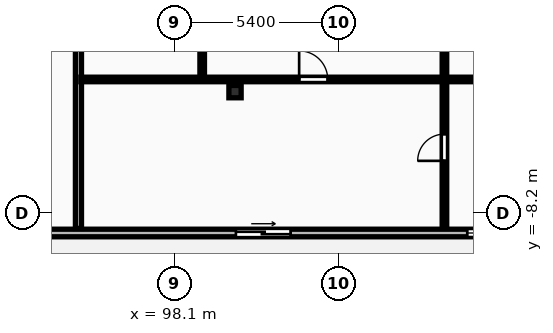
"""IFC4 building model, lengths in metres.
Left out: names, types, materials, properties, quantities, classifications, styles, units other than length and angle.
Written with IfcOpenShell. Run it as: python <this file> out.ifc"""

import sys

from ifc_helpers import new_model, si_unit, direction, frame, frame_2d, origin, origin_2d, place, context, subcontext, project, spatial, rectangle, i_section, extrude, element, fill, save


model = new_model("IFC4")
c1 = context("Model", 3, precision=1e-05, world=origin(), true_north=direction((0.0, 1.0)))
c2 = subcontext(c1, "Body", "Model", "MODEL_VIEW")
j1 = project(units=[si_unit("LENGTHUNIT", "METRE"), si_unit("PLANEANGLEUNIT", "RADIAN")], contexts=[c1])
p1 = place(None, origin())
s1 = spatial("IfcSite", under=j1, at=p1, CompositionType="ELEMENT")
p2 = place(p1, origin())
s2 = spatial("IfcBuilding", under=s1, at=p2, CompositionType="ELEMENT")
p3 = place(p2, frame((0.0, 0.0, 139.3)))
s3 = spatial("IfcBuildingStorey", under=s2, at=p3, CompositionType="ELEMENT", Elevation=139.3)
p4 = place(p3, frame((100.1, -4.2, 0.0), z_axis=(0.0, 0.0, 1.0), x_axis=(1.0, 0.0, 0.0)))
e1 = element("IfcColumn", 1, at=p4, inside=s3, PredefinedType="COLUMN", context=c2, shape_type="SweptSolid", body=[
    extrude(i_section(OverallWidth=0.403, OverallDepth=0.406, WebThickness=0.027, FlangeThickness=0.043, FilletRadius=0.015, at=origin_2d()), origin(), (0.0, 0.0, 1.0), 3.6),
])
p5 = place(p3, frame((72.7, -8.85, 0.0), z_axis=(0.0, 0.0, 1.0), x_axis=(1.0, 0.0, 0.0)))
e2 = element("IfcWall", 2, at=p5, inside=s3, PredefinedType="STANDARD", context=c2, shape_type="SweptSolid", body=[
    extrude(rectangle(XDim=58.0, YDim=0.25, at=frame_2d((29.0, 0.0))), origin(), (0.0, 0.0, 1.0), 3.31),
])
p6 = place(p5, frame((6.625, 0.0, 0.85)))
e3 = element("IfcOpeningElement", 3, at=p6, cuts=e2, PredefinedType="OPENING", context=c2, shape_type="SweptSolid", body=[
    extrude(rectangle(XDim=2.4, YDim=1.9, at=frame_2d((1.2, 0.95))), frame((0.0, 0.135, 0.0), z_axis=(0.0, -1.0, 0.0), x_axis=(1.0, 0.0, 0.0)), (0.0, 0.0, 1.0), 0.27),
])
p7 = place(p5, frame((12.7, 0.0, 0.85)))
e4 = element("IfcOpeningElement", 4, at=p7, cuts=e2, PredefinedType="OPENING", context=c2, shape_type="SweptSolid", body=[
    extrude(rectangle(XDim=2.4, YDim=1.9, at=frame_2d((1.2, 0.95))), frame((0.0, 0.135, 0.0), z_axis=(0.0, -1.0, 0.0), x_axis=(1.0, 0.0, 0.0)), (0.0, 0.0, 1.0), 0.27),
])
p8 = place(p5, frame((1.345, 0.0, 0.0)))
e5 = element("IfcOpeningElement", 5, at=p8, cuts=e2, PredefinedType="OPENING", context=c2, shape_type="SweptSolid", body=[
    extrude(rectangle(XDim=1.8, YDim=2.2, at=frame_2d((0.9, 1.1))), frame((0.0, 0.135, 0.0), z_axis=(0.0, -1.0, 0.0), x_axis=(1.0, 0.0, 0.0)), (0.0, 0.0, 1.0), 0.27),
])
p9 = place(p5, frame((18.125, 0.0, 0.85)))
e6 = element("IfcOpeningElement", 6, at=p9, cuts=e2, PredefinedType="OPENING", context=c2, shape_type="SweptSolid", body=[
    extrude(rectangle(XDim=2.4, YDim=1.9, at=frame_2d((1.2, 0.95))), frame((0.0, 0.135, 0.0), z_axis=(0.0, -1.0, 0.0), x_axis=(1.0, 0.0, 0.0)), (0.0, 0.0, 1.0), 0.27),
])
p10 = place(p5, frame((27.429, 0.0, 0.0)))
e7 = element("IfcOpeningElement", 7, at=p10, cuts=e2, PredefinedType="OPENING", context=c2, shape_type="SweptSolid", body=[
    extrude(rectangle(XDim=1.8, YDim=2.2, at=frame_2d((0.9, 1.1))), frame((0.0, 0.135, 0.0), z_axis=(0.0, -1.0, 0.0), x_axis=(1.0, 0.0, 0.0)), (0.0, 0.0, 1.0), 0.27),
])
p11 = place(p5, frame((35.038, 0.0, 0.85)))
e8 = element("IfcOpeningElement", 8, at=p11, cuts=e2, PredefinedType="OPENING", context=c2, shape_type="SweptSolid", body=[
    extrude(rectangle(XDim=1.8, YDim=1.8, at=frame_2d((0.9, 0.9))), frame((0.0, 0.135, 0.0), z_axis=(0.0, -1.0, 0.0), x_axis=(1.0, 0.0, 0.0)), (0.0, 0.0, 1.0), 0.27),
])
p12 = place(p5, frame((43.911, 0.0, 0.85)))
e9 = element("IfcOpeningElement", 9, at=p12, cuts=e2, PredefinedType="OPENING", context=c2, shape_type="SweptSolid", body=[
    extrude(rectangle(XDim=2.4, YDim=1.9, at=frame_2d((1.2, 0.95))), frame((0.0, 0.135, 0.0), z_axis=(0.0, -1.0, 0.0), x_axis=(1.0, 0.0, 0.0)), (0.0, 0.0, 1.0), 0.27),
])
p13 = place(p5, frame((49.387, 0.0, 0.85)))
e10 = element("IfcOpeningElement", 10, at=p13, cuts=e2, PredefinedType="OPENING", context=c2, shape_type="SweptSolid", body=[
    extrude(rectangle(XDim=2.4, YDim=1.9, at=frame_2d((1.2, 0.95))), frame((0.0, 0.135, 0.0), z_axis=(0.0, -1.0, 0.0), x_axis=(1.0, 0.0, 0.0)), (0.0, 0.0, 1.0), 0.27),
])
p14 = place(p5, frame((39.263, 0.0, 0.0)))
e11 = element("IfcOpeningElement", 11, at=p14, cuts=e2, PredefinedType="OPENING", context=c2, shape_type="SweptSolid", body=[
    extrude(rectangle(XDim=1.8, YDim=2.2, at=frame_2d((0.9, 1.1))), frame((0.0, 0.135, 0.0), z_axis=(0.0, -1.0, 0.0), x_axis=(1.0, 0.0, 0.0)), (0.0, 0.0, 1.0), 0.27),
])
p15 = place(p5, frame((54.465, 0.0, 0.85)))
e12 = element("IfcOpeningElement", 12, at=p15, cuts=e2, PredefinedType="OPENING", context=c2, shape_type="SweptSolid", body=[
    extrude(rectangle(XDim=2.4, YDim=1.9, at=frame_2d((1.2, 0.95))), frame((0.0, 0.135, 0.0), z_axis=(0.0, -1.0, 0.0), x_axis=(1.0, 0.0, 0.0)), (0.0, 0.0, 1.0), 0.27),
])
p16 = place(p3, frame((94.95, -8.7, 0.0), z_axis=(0.0, 0.0, 1.0), x_axis=(0.0, 1.0, 0.0)))
e13 = element("IfcWall", 13, at=p16, inside=s3, PredefinedType="PARTITIONING", context=c2, shape_type="SweptSolid", body=[
    extrude(rectangle(XDim=24.57, YDim=0.2, at=frame_2d((12.285, 0.0))), origin(), (0.0, 0.0, 1.0), 3.31),
])
p17 = place(p3, frame((99.02, -3.74, 0.0), z_axis=(0.0, 0.0, 1.0), x_axis=(0.0, 1.0, 0.0)))
e14 = element("IfcWall", 14, at=p17, inside=s3, PredefinedType="PARTITIONING", context=c2, shape_type="SweptSolid", body=[
    extrude(rectangle(XDim=5.0, YDim=0.15, at=frame_2d((2.5, 0.0))), origin(), (0.0, 0.0, 1.0), 3.31),
])
p18 = place(p17, frame((2.06, 0.0, 0.0)))
e15 = element("IfcOpeningElement", 15, at=p18, cuts=e14, PredefinedType="OPENING", context=c2, shape_type="SweptSolid", body=[
    extrude(rectangle(XDim=0.88, YDim=2.06, at=frame_2d((0.44, 1.03))), frame((0.0, 0.085, 0.0), z_axis=(0.0, -1.0, 0.0), x_axis=(1.0, 0.0, 0.0)), (0.0, 0.0, 1.0), 0.17),
])
p19 = place(p3, frame((106.988, -8.7, 0.0), z_axis=(0.0, 0.0, 1.0), x_axis=(0.0, 1.0, 0.0)))
e16 = element("IfcWall", 16, at=p19, inside=s3, PredefinedType="PARTITIONING", context=c2, shape_type="SweptSolid", body=[
    extrude(rectangle(XDim=9.96, YDim=0.15, at=frame_2d((4.98, 0.0))), origin(), (0.0, 0.0, 1.0), 3.31),
])
p20 = place(p19, frame((5.894, 0.0, 0.0)))
e17 = element("IfcOpeningElement", 17, at=p20, cuts=e16, PredefinedType="OPENING", context=c2, shape_type="SweptSolid", body=[
    extrude(rectangle(XDim=0.84, YDim=2.04, at=frame_2d((0.42, 1.02))), frame((0.0, 0.085, 0.0), z_axis=(0.0, -1.0, 0.0), x_axis=(1.0, 0.0, 0.0)), (0.0, 0.0, 1.0), 0.17),
])
p21 = place(p19, frame((7.69, 0.0, 0.0)))
e18 = element("IfcOpeningElement", 18, at=p21, cuts=e16, PredefinedType="OPENING", context=c2, shape_type="SweptSolid", body=[
    extrude(rectangle(XDim=0.84, YDim=2.04, at=frame_2d((0.42, 1.02))), frame((0.0, 0.085, 0.0), z_axis=(0.0, -1.0, 0.0), x_axis=(1.0, 0.0, 0.0)), (0.0, 0.0, 1.0), 0.17),
])
p22 = place(p19, frame((2.223, 0.0, 0.0)))
e19 = element("IfcOpeningElement", 19, at=p22, cuts=e16, PredefinedType="OPENING", context=c2, shape_type="SweptSolid", body=[
    extrude(rectangle(XDim=0.88, YDim=2.06, at=frame_2d((0.44, 1.03))), frame((0.0, 0.085, 0.0), z_axis=(0.0, -1.0, 0.0), x_axis=(1.0, 0.0, 0.0)), (0.0, 0.0, 1.0), 0.17),
])
p23 = place(p3, frame((95.03, -3.8, 0.0), z_axis=(0.0, 0.0, 1.0), x_axis=(1.0, 0.0, 0.0)))
e20 = element("IfcWall", 20, at=p23, inside=s3, PredefinedType="PARTITIONING", context=c2, shape_type="SweptSolid", body=[
    extrude(rectangle(XDim=15.298, YDim=0.15, at=frame_2d((7.649, 0.0))), origin(), (0.0, 0.0, 1.0), 3.31),
])
p24 = place(p23, frame((7.179, 0.0, 0.0)))
e21 = element("IfcOpeningElement", 21, at=p24, cuts=e20, PredefinedType="OPENING", context=c2, shape_type="SweptSolid", body=[
    extrude(rectangle(XDim=0.94, YDim=2.1, at=frame_2d((0.47, 1.05))), frame((0.0, 0.085, 0.0), z_axis=(0.0, -1.0, 0.0), x_axis=(1.0, 0.0, 0.0)), (0.0, 0.0, 1.0), 0.17),
])
p25 = place(p10, origin())
e22 = element("IfcDoor", 22, at=p25, inside=s3, OperationType="SLIDING_TO_RIGHT", PredefinedType="DOOR", context=c2, shape_type="SweptSolid", body=[
    extrude(rectangle(XDim=1.8, YDim=2.2, at=frame_2d((0.9, 1.1))), frame((0.0, 0.025, 0.0), z_axis=(0.0, -1.0, 0.0), x_axis=(1.0, 0.0, 0.0)), (0.0, 0.0, 1.0), 0.05),
])
fill(e7, e22)
p26 = place(p11, origin())
e23 = element("IfcWindow", 23, at=p26, inside=s3, PartitioningType="SINGLE_PANEL", PredefinedType="WINDOW", context=c2, shape_type="SweptSolid", body=[
    extrude(rectangle(XDim=1.8, YDim=1.8, at=frame_2d((0.9, 0.9))), frame((0.0, 0.03, 0.0), z_axis=(0.0, -1.0, 0.0), x_axis=(1.0, 0.0, 0.0)), (0.0, 0.0, 1.0), 0.06),
])
fill(e8, e23)
p27 = place(p22, origin())
e24 = element("IfcDoor", 24, at=p27, inside=s3, OperationType="SINGLE_SWING_LEFT", PredefinedType="DOOR", context=c2, shape_type="SweptSolid", body=[
    extrude(rectangle(XDim=0.88, YDim=2.06, at=frame_2d((0.44, 1.03))), frame((0.0, 0.025, 0.0), z_axis=(0.0, -1.0, 0.0), x_axis=(1.0, 0.0, 0.0)), (0.0, 0.0, 1.0), 0.05),
])
fill(e19, e24)
p28 = place(p24, origin())
e25 = element("IfcDoor", 25, at=p28, inside=s3, OperationType="SINGLE_SWING_LEFT", PredefinedType="DOOR", context=c2, shape_type="SweptSolid", body=[
    extrude(rectangle(XDim=0.94, YDim=2.1, at=frame_2d((0.47, 1.05))), frame((0.0, 0.025, 0.0), z_axis=(0.0, -1.0, 0.0), x_axis=(1.0, 0.0, 0.0)), (0.0, 0.0, 1.0), 0.05),
])
fill(e21, e25)
save(model, sys.argv[1])
